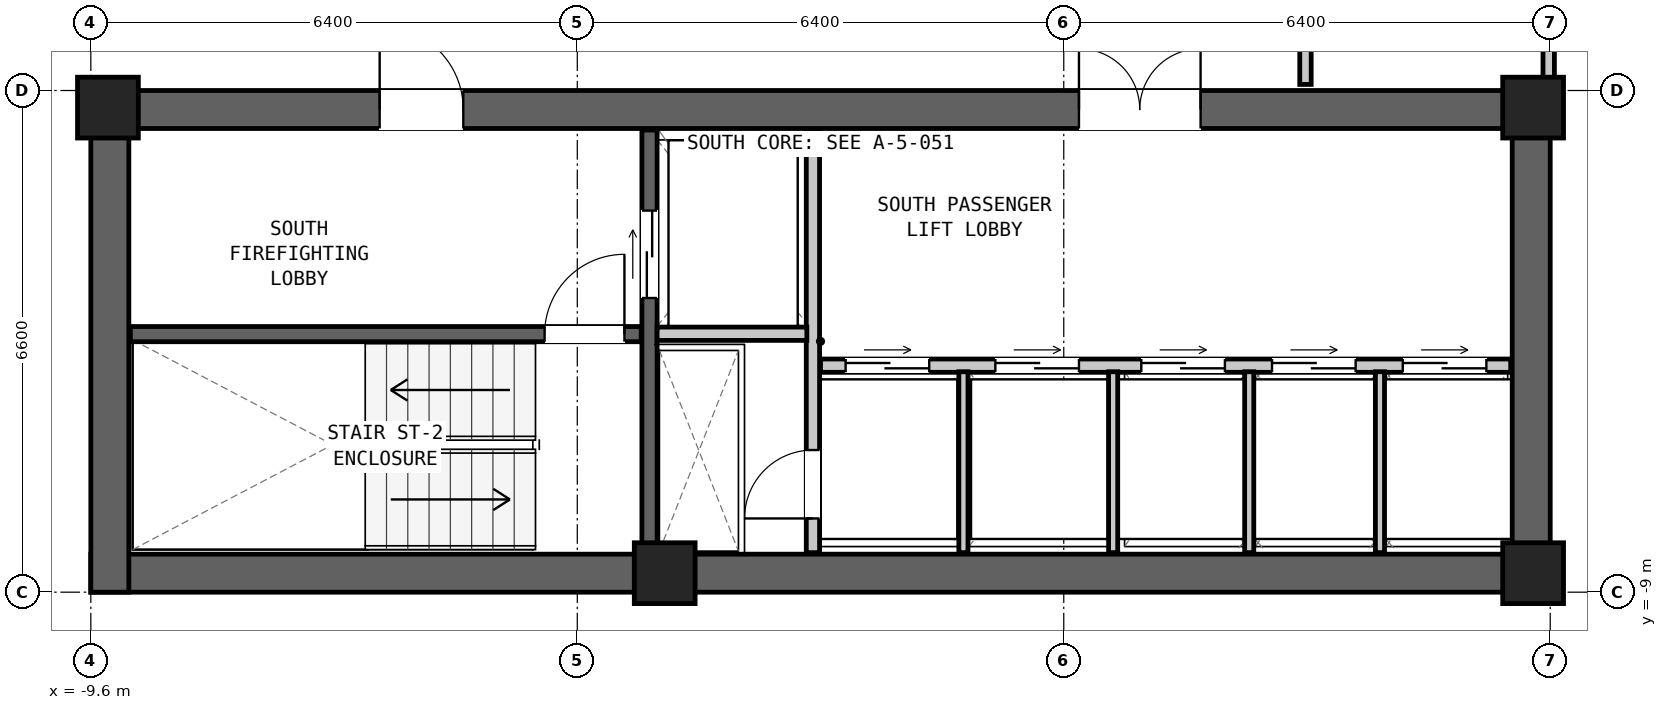
"""IFC4 building model, lengths in metres.
Left out: names, types, materials, properties, quantities, classifications, styles, units other than length and angle.
Written with IfcOpenShell. Run it as: python <this file> out.ifc"""

import sys

from ifc_helpers import new_model, si_unit, direction, frame, frame_2d, origin, origin_2d, place, context, subcontext, project, spatial, rectangle, extrude, element, fill, save


model = new_model("IFC4")
c1 = context("Model", 3, precision=1e-05, world=origin(), true_north=direction((0.0, 1.0)))
c2 = subcontext(c1, "Body", "Model", "MODEL_VIEW")
j1 = project(units=[si_unit("LENGTHUNIT", "METRE"), si_unit("PLANEANGLEUNIT", "RADIAN")], contexts=[c1])
p1 = place(None, origin())
s1 = spatial("IfcSite", under=j1, at=p1, CompositionType="ELEMENT")
p2 = place(p1, origin())
s2 = spatial("IfcBuilding", under=s1, at=p2, CompositionType="ELEMENT")
p3 = place(p2, frame((0.0, 0.0, 165.3)))
s3 = spatial("IfcBuildingStorey", under=s2, at=p3, CompositionType="ELEMENT", Elevation=165.3)
p4 = place(p3, frame((-9.6, -8.75, 0.0), z_axis=(0.0, 0.0, 1.0), x_axis=(1.0, 0.0, 0.0)))
e1 = element("IfcWall", 1, at=p4, inside=s3, PredefinedType="SHEAR", context=c2, shape_type="SweptSolid", body=[
    extrude(rectangle(XDim=19.2, YDim=0.5, at=frame_2d((9.6, 0.0))), origin(), (0.0, 0.0, 1.0), 3.05),
])
p5 = place(p3, frame((-9.6, -2.65, 0.0), z_axis=(0.0, 0.0, 1.0), x_axis=(1.0, 0.0, 0.0)))
e2 = element("IfcWall", 2, at=p5, inside=s3, PredefinedType="SHEAR", context=c2, shape_type="SweptSolid", body=[
    extrude(rectangle(XDim=19.2, YDim=0.5, at=frame_2d((9.6, 0.0))), origin(), (0.0, 0.0, 1.0), 3.05),
])
p6 = place(p5, frame((3.8, 0.0, 0.0)))
e3 = element("IfcOpeningElement", 3, at=p6, cuts=e2, PredefinedType="OPENING", context=c2, shape_type="SweptSolid", body=[
    extrude(rectangle(XDim=1.1, YDim=2.08, at=frame_2d((0.55, 1.04))), frame((0.0, 0.262, 0.0), z_axis=(0.0, -1.0, 0.0), x_axis=(1.0, 0.0, 0.0)), (0.0, 0.0, 1.0), 0.524),
])
p7 = place(p5, frame((13.0, 0.0, 0.0)))
e4 = element("IfcOpeningElement", 4, at=p7, cuts=e2, PredefinedType="OPENING", context=c2, shape_type="SweptSolid", body=[
    extrude(rectangle(XDim=1.6, YDim=2.12, at=frame_2d((0.8, 1.06))), frame((0.0, 0.262, 0.0), z_axis=(0.0, -1.0, 0.0), x_axis=(1.0, 0.0, 0.0)), (0.0, 0.0, 1.0), 0.524),
])
for number, where, z_axis, x_axis in (
    (5, (-9.35, -9.0, 0.0), (0.0, 0.0, 1.0), (0.0, 1.0, 0.0)),
    (6, (9.35, -9.0, 0.0), (0.0, 0.0, 1.0), (0.0, 1.0, 0.0)),
):
    element("IfcWall", number, at=place(p3, frame(where, z_axis=z_axis, x_axis=x_axis)), inside=s3, PredefinedType="SHEAR", context=c2, shape_type="SweptSolid", body=[
        extrude(rectangle(XDim=6.6, YDim=0.5, at=frame_2d((3.3, 0.0))), origin(), (0.0, 0.0, 1.0), 3.05),
    ])
for number, where, z_axis, x_axis in (
    (7, (-9.375, -2.625, 0.0), (0.0, 0.0, 1.0), (1.0, 0.0, 0.0)),
    (8, (9.375, -2.625, 0.0), (0.0, 0.0, 1.0), (1.0, 0.0, 0.0)),
    (9, (-2.05, -8.75, 0.0), (0.0, 0.0, 1.0), (1.0, 0.0, 0.0)),
    (10, (9.375, -8.75, 0.0), (0.0, 0.0, 1.0), (1.0, 0.0, 0.0)),
):
    element("IfcColumn", number, at=place(p3, frame(where, z_axis=z_axis, x_axis=x_axis)), inside=s3, PredefinedType="COLUMN", context=c2, shape_type="SweptSolid", body=[
        extrude(rectangle(XDim=0.8, YDim=0.8, at=origin_2d()), origin(), (0.0, 0.0, 1.0), 3.05),
    ])
p8 = place(p3, frame((-9.08, -5.605, 0.0), z_axis=(0.0, 0.0, 1.0), x_axis=(1.0, 0.0, 0.0)))
e11 = element("IfcWall", 11, at=p8, inside=s3, PredefinedType="SHEAR", context=c2, shape_type="SweptSolid", body=[
    extrude(rectangle(XDim=6.72, YDim=0.2, at=frame_2d((3.36, 0.0))), origin(), (0.0, 0.0, 1.0), 2.83),
])
p9 = place(p8, frame((5.45, 0.0, 0.0)))
e12 = element("IfcOpeningElement", 12, at=p9, cuts=e11, PredefinedType="OPENING", context=c2, shape_type="SweptSolid", body=[
    extrude(rectangle(XDim=1.05, YDim=2.08, at=frame_2d((0.525, 1.04))), frame((0.0, 0.112, 0.0), z_axis=(0.0, -1.0, 0.0), x_axis=(1.0, 0.0, 0.0)), (0.0, 0.0, 1.0), 0.224),
])
p10 = place(p3, frame((-2.25, -8.48, 0.0), z_axis=(0.0, 0.0, 1.0), x_axis=(0.0, 1.0, 0.0)))
e13 = element("IfcWall", 13, at=p10, inside=s3, PredefinedType="SHEAR", context=c2, shape_type="SweptSolid", body=[
    extrude(rectangle(XDim=5.56, YDim=0.2, at=frame_2d((2.78, 0.0))), origin(), (0.0, 0.0, 1.0), 2.83),
])
p11 = place(p10, frame((3.35, 0.0, 0.0)))
e14 = element("IfcOpeningElement", 14, at=p11, cuts=e13, PredefinedType="OPENING", context=c2, shape_type="SweptSolid", body=[
    extrude(rectangle(XDim=1.15, YDim=2.08, at=frame_2d((0.575, 1.04))), frame((0.0, 0.112, 0.0), z_axis=(0.0, -1.0, 0.0), x_axis=(1.0, 0.0, 0.0)), (0.0, 0.0, 1.0), 0.224),
])
p12 = place(p3, frame((-0.1, -8.48, 0.0), z_axis=(0.0, 0.0, 1.0), x_axis=(0.0, 1.0, 0.0)))
e15 = element("IfcWall", 15, at=p12, inside=s3, PredefinedType="PARTITIONING", context=c2, shape_type="SweptSolid", body=[
    extrude(rectangle(XDim=5.56, YDim=0.175, at=frame_2d((2.78, 0.0))), origin(), (0.0, 0.0, 1.0), 2.83),
])
p13 = place(p12, frame((0.45, 0.0, 0.0)))
e16 = element("IfcOpeningElement", 16, at=p13, cuts=e15, PredefinedType="OPENING", context=c2, shape_type="SweptSolid", body=[
    extrude(rectangle(XDim=0.9, YDim=2.05, at=frame_2d((0.45, 1.025))), frame((0.0, 0.1, 0.0), z_axis=(0.0, -1.0, 0.0), x_axis=(1.0, 0.0, 0.0)), (0.0, 0.0, 1.0), 0.199),
])
p14 = place(p3, frame((-2.15, -5.6, 0.0), z_axis=(0.0, 0.0, 1.0), x_axis=(1.0, 0.0, 0.0)))
e17 = element("IfcWall", 17, at=p14, inside=s3, PredefinedType="PARTITIONING", context=c2, shape_type="SweptSolid", body=[
    extrude(rectangle(XDim=1.97, YDim=0.175, at=frame_2d((0.985, 0.0))), origin(), (0.0, 0.0, 1.0), 2.83),
])
p15 = place(p3, frame((0.0, -6.02, 0.0), z_axis=(0.0, 0.0, 1.0), x_axis=(1.0, 0.0, 0.0)))
e18 = element("IfcWall", 18, at=p15, inside=s3, PredefinedType="PARTITIONING", context=c2, shape_type="SweptSolid", body=[
    extrude(rectangle(XDim=9.08, YDim=0.175, at=frame_2d((4.54, 0.0))), origin(), (0.0, 0.0, 1.0), 2.83),
])
p16 = place(p15, frame((0.33, 0.0, 0.0)))
e19 = element("IfcOpeningElement", 19, at=p16, cuts=e18, PredefinedType="OPENING", context=c2, shape_type="SweptSolid", body=[
    extrude(rectangle(XDim=1.1, YDim=2.06, at=frame_2d((0.55, 1.03))), frame((0.0, 0.1, 0.0), z_axis=(0.0, -1.0, 0.0), x_axis=(1.0, 0.0, 0.0)), (0.0, 0.0, 1.0), 0.199),
])
p17 = place(p15, frame((2.3, 0.0, 0.0)))
e20 = element("IfcOpeningElement", 20, at=p17, cuts=e18, PredefinedType="OPENING", context=c2, shape_type="SweptSolid", body=[
    extrude(rectangle(XDim=1.1, YDim=2.06, at=frame_2d((0.55, 1.03))), frame((0.0, 0.1, 0.0), z_axis=(0.0, -1.0, 0.0), x_axis=(1.0, 0.0, 0.0)), (0.0, 0.0, 1.0), 0.199),
])
p18 = place(p15, frame((4.22, 0.0, 0.0)))
e21 = element("IfcOpeningElement", 21, at=p18, cuts=e18, PredefinedType="OPENING", context=c2, shape_type="SweptSolid", body=[
    extrude(rectangle(XDim=1.1, YDim=2.06, at=frame_2d((0.55, 1.03))), frame((0.0, 0.1, 0.0), z_axis=(0.0, -1.0, 0.0), x_axis=(1.0, 0.0, 0.0)), (0.0, 0.0, 1.0), 0.199),
])
p19 = place(p15, frame((5.94, 0.0, 0.0)))
e22 = element("IfcOpeningElement", 22, at=p19, cuts=e18, PredefinedType="OPENING", context=c2, shape_type="SweptSolid", body=[
    extrude(rectangle(XDim=1.1, YDim=2.06, at=frame_2d((0.55, 1.03))), frame((0.0, 0.1, 0.0), z_axis=(0.0, -1.0, 0.0), x_axis=(1.0, 0.0, 0.0)), (0.0, 0.0, 1.0), 0.199),
])
p20 = place(p15, frame((7.66, 0.0, 0.0)))
e23 = element("IfcOpeningElement", 23, at=p20, cuts=e18, PredefinedType="OPENING", context=c2, shape_type="SweptSolid", body=[
    extrude(rectangle(XDim=1.1, YDim=2.06, at=frame_2d((0.55, 1.03))), frame((0.0, 0.1, 0.0), z_axis=(0.0, -1.0, 0.0), x_axis=(1.0, 0.0, 0.0)), (0.0, 0.0, 1.0), 0.199),
])
for number, where, z_axis, x_axis in (
    (24, (1.88, -8.48, 0.0), (0.0, 0.0, 1.0), (0.0, 1.0, 0.0)),
    (25, (3.85, -8.48, 0.0), (0.0, 0.0, 1.0), (0.0, 1.0, 0.0)),
    (26, (5.64, -8.48, 0.0), (0.0, 0.0, 1.0), (0.0, 1.0, 0.0)),
    (27, (7.36, -8.48, 0.0), (0.0, 0.0, 1.0), (0.0, 1.0, 0.0)),
):
    element("IfcWall", number, at=place(p3, frame(where, z_axis=z_axis, x_axis=x_axis)), inside=s3, PredefinedType="PARTITIONING", context=c2, shape_type="SweptSolid", body=[
        extrude(rectangle(XDim=2.38, YDim=0.12, at=frame_2d((1.19, 0.0))), origin(), (0.0, 0.0, 1.0), 2.83),
    ])
p21 = place(p3, frame((6.38, -2.32, 0.0), z_axis=(0.0, 0.0, 1.0), x_axis=(0.0, 1.0, 0.0)))
e28 = element("IfcWall", 28, at=p21, inside=s3, PredefinedType="PARTITIONING", context=c2, shape_type="SweptSolid", body=[
    extrude(rectangle(XDim=5.84, YDim=0.15, at=frame_2d((2.92, 0.0))), origin(), (0.0, 0.0, 1.0), 2.198),
])
p22 = place(p3, frame((9.58, -2.32, 0.0), z_axis=(0.0, 0.0, 1.0), x_axis=(0.0, 1.0, 0.0)))
e29 = element("IfcWall", 29, at=p22, inside=s3, PredefinedType="PARTITIONING", context=c2, shape_type="SweptSolid", body=[
    extrude(rectangle(XDim=5.84, YDim=0.15, at=frame_2d((2.92, 0.0))), origin(), (0.0, 0.0, 1.0), 2.198),
])
p23 = place(p22, frame((2.445, 0.0, 0.0)))
e30 = element("IfcOpeningElement", 30, at=p23, cuts=e29, PredefinedType="OPENING", context=c2, shape_type="SweptSolid", body=[
    extrude(rectangle(XDim=0.95, YDim=2.1, at=frame_2d((0.475, 1.05))), frame((0.0, 0.087, 0.0), z_axis=(0.0, -1.0, 0.0), x_axis=(1.0, 0.0, 0.0)), (0.0, 0.0, 1.0), 0.174),
])
p24 = place(p9, origin())
e31 = element("IfcDoor", 31, at=p24, inside=s3, OperationType="SINGLE_SWING_RIGHT", PredefinedType="DOOR", context=c2, shape_type="SweptSolid", body=[
    extrude(rectangle(XDim=1.05, YDim=2.08, at=frame_2d((0.525, 1.04))), frame((0.0, 0.025, 0.0), z_axis=(0.0, -1.0, 0.0), x_axis=(1.0, 0.0, 0.0)), (0.0, 0.0, 1.0), 0.05),
])
fill(e12, e31)
p25 = place(p6, origin())
e32 = element("IfcDoor", 32, at=p25, inside=s3, OperationType="SINGLE_SWING_LEFT", PredefinedType="DOOR", context=c2, shape_type="SweptSolid", body=[
    extrude(rectangle(XDim=1.1, YDim=2.08, at=frame_2d((0.55, 1.04))), frame((0.0, 0.025, 0.0), z_axis=(0.0, -1.0, 0.0), x_axis=(1.0, 0.0, 0.0)), (0.0, 0.0, 1.0), 0.05),
])
fill(e3, e32)
p26 = place(p11, origin())
e33 = element("IfcDoor", 33, at=p26, inside=s3, OperationType="DOUBLE_DOOR_SLIDING", PredefinedType="DOOR", context=c2, shape_type="SweptSolid", body=[
    extrude(rectangle(XDim=1.15, YDim=2.08, at=frame_2d((0.575, 1.04))), frame((0.0, 0.025, 0.0), z_axis=(0.0, -1.0, 0.0), x_axis=(1.0, 0.0, 0.0)), (0.0, 0.0, 1.0), 0.05),
])
fill(e14, e33)
p27 = place(p13, origin())
e34 = element("IfcDoor", 34, at=p27, inside=s3, OperationType="SINGLE_SWING_LEFT", PredefinedType="DOOR", context=c2, shape_type="SweptSolid", body=[
    extrude(rectangle(XDim=0.9, YDim=2.05, at=frame_2d((0.45, 1.025))), frame((0.0, 0.025, 0.0), z_axis=(0.0, -1.0, 0.0), x_axis=(1.0, 0.0, 0.0)), (0.0, 0.0, 1.0), 0.05),
])
fill(e16, e34)
p28 = place(p16, origin())
e35 = element("IfcDoor", 35, at=p28, inside=s3, OperationType="DOUBLE_DOOR_SLIDING", PredefinedType="DOOR", context=c2, shape_type="SweptSolid", body=[
    extrude(rectangle(XDim=1.1, YDim=2.06, at=frame_2d((0.55, 1.03))), frame((0.0, 0.025, 0.0), z_axis=(0.0, -1.0, 0.0), x_axis=(1.0, 0.0, 0.0)), (0.0, 0.0, 1.0), 0.05),
])
fill(e19, e35)
p29 = place(p17, origin())
e36 = element("IfcDoor", 36, at=p29, inside=s3, OperationType="DOUBLE_DOOR_SLIDING", PredefinedType="DOOR", context=c2, shape_type="SweptSolid", body=[
    extrude(rectangle(XDim=1.1, YDim=2.06, at=frame_2d((0.55, 1.03))), frame((0.0, 0.025, 0.0), z_axis=(0.0, -1.0, 0.0), x_axis=(1.0, 0.0, 0.0)), (0.0, 0.0, 1.0), 0.05),
])
fill(e20, e36)
p30 = place(p7, origin())
e37 = element("IfcDoor", 37, at=p30, inside=s3, OperationType="DOUBLE_DOOR_SINGLE_SWING", PredefinedType="DOOR", context=c2, shape_type="SweptSolid", body=[
    extrude(rectangle(XDim=1.6, YDim=2.12, at=frame_2d((0.8, 1.06))), frame((0.0, 0.025, 0.0), z_axis=(0.0, -1.0, 0.0), x_axis=(1.0, 0.0, 0.0)), (0.0, 0.0, 1.0), 0.05),
])
fill(e4, e37)
p31 = place(p18, origin())
e38 = element("IfcDoor", 38, at=p31, inside=s3, OperationType="DOUBLE_DOOR_SLIDING", PredefinedType="DOOR", context=c2, shape_type="SweptSolid", body=[
    extrude(rectangle(XDim=1.1, YDim=2.06, at=frame_2d((0.55, 1.03))), frame((0.0, 0.025, 0.0), z_axis=(0.0, -1.0, 0.0), x_axis=(1.0, 0.0, 0.0)), (0.0, 0.0, 1.0), 0.05),
])
fill(e21, e38)
p32 = place(p19, origin())
e39 = element("IfcDoor", 39, at=p32, inside=s3, OperationType="DOUBLE_DOOR_SLIDING", PredefinedType="DOOR", context=c2, shape_type="SweptSolid", body=[
    extrude(rectangle(XDim=1.1, YDim=2.06, at=frame_2d((0.55, 1.03))), frame((0.0, 0.025, 0.0), z_axis=(0.0, -1.0, 0.0), x_axis=(1.0, 0.0, 0.0)), (0.0, 0.0, 1.0), 0.05),
])
fill(e22, e39)
p33 = place(p20, origin())
e40 = element("IfcDoor", 40, at=p33, inside=s3, OperationType="DOUBLE_DOOR_SLIDING", PredefinedType="DOOR", context=c2, shape_type="SweptSolid", body=[
    extrude(rectangle(XDim=1.1, YDim=2.06, at=frame_2d((0.55, 1.03))), frame((0.0, 0.025, 0.0), z_axis=(0.0, -1.0, 0.0), x_axis=(1.0, 0.0, 0.0)), (0.0, 0.0, 1.0), 0.05),
])
fill(e23, e40)
save(model, sys.argv[1])
